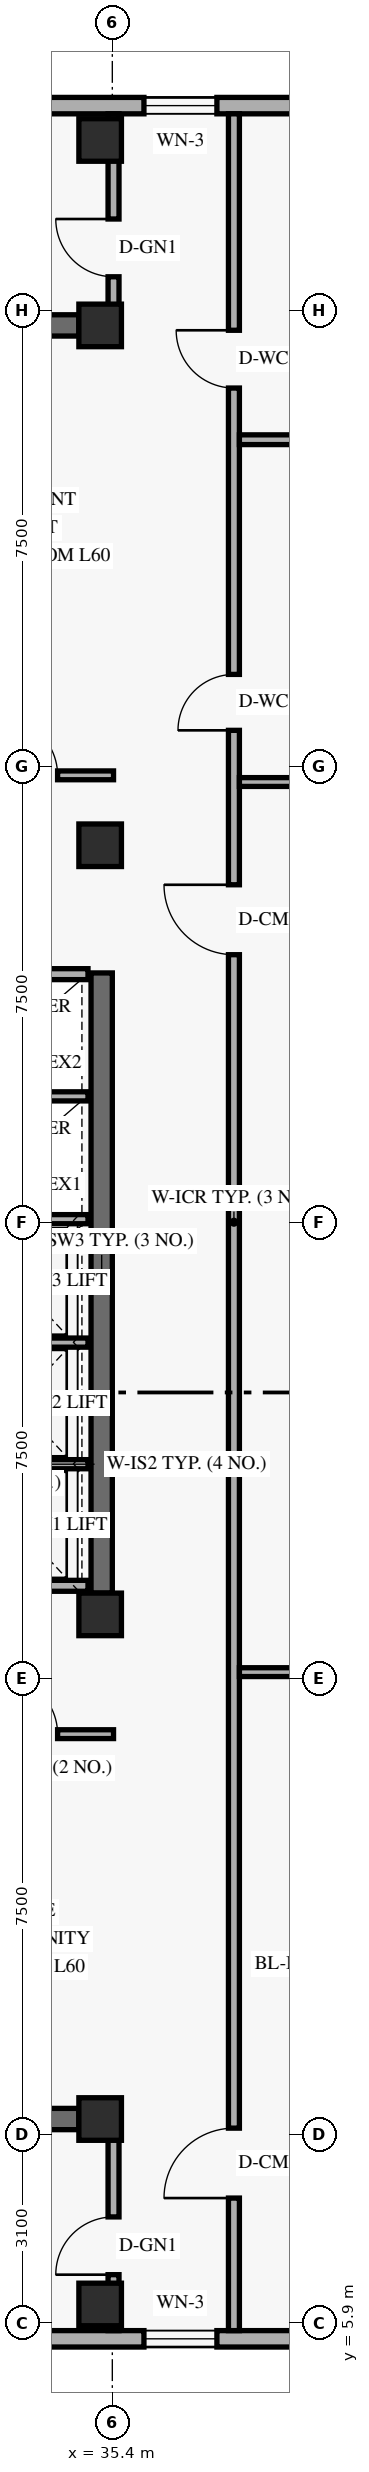
"""IFC4 building model, lengths in metres.
Left out: names, types, materials, properties, quantities, classifications, styles, units other than length and angle.
Written with IfcOpenShell. Run it as: python <this file> out.ifc"""

import sys

from ifc_helpers import new_model, si_unit, direction, frame, frame_2d, origin, origin_2d, place, context, subcontext, project, spatial, rectangle, extrude, element, fill, save


model = new_model("IFC4")
c1 = context("Model", 3, precision=1e-05, world=origin(), true_north=direction((0.0, 1.0)))
c2 = subcontext(c1, "Body", "Model", "MODEL_VIEW")
j1 = project(units=[si_unit("LENGTHUNIT", "METRE"), si_unit("PLANEANGLEUNIT", "RADIAN")], contexts=[c1])
p1 = place(None, origin())
s1 = spatial("IfcSite", under=j1, at=p1, CompositionType="ELEMENT")
p2 = place(p1, origin())
s2 = spatial("IfcBuilding", under=s1, at=p2, CompositionType="ELEMENT")
p3 = place(p2, frame((0.0, 0.0, 231.0)))
s3 = spatial("IfcBuildingStorey", under=s2, at=p3, CompositionType="ELEMENT", Elevation=231.0)
p4 = place(p3, frame((35.225, 17.9, 0.0), z_axis=(0.0, 0.0, 1.0), x_axis=(0.0, 1.0, 0.0)))
e1 = element("IfcWall", 1, at=p4, inside=s3, PredefinedType="SHEAR", context=c2, shape_type="SweptSolid", body=[
    extrude(rectangle(XDim=10.2, YDim=0.35, at=frame_2d((5.1, 0.0))), origin(), (0.0, 0.0, 1.0), 3.421),
])
for number, where, z_axis, x_axis in (
    (2, (24.55, 9.25, 0.0), (0.0, 0.0, 1.0), (1.0, 0.0, 0.0)),
    (3, (24.55, 38.75, 0.0), (0.0, 0.0, 1.0), (1.0, 0.0, 0.0)),
):
    element("IfcWall", number, at=place(p3, frame(where, z_axis=z_axis, x_axis=x_axis)), inside=s3, PredefinedType="SHEAR", context=c2, shape_type="SweptSolid", body=[
        extrude(rectangle(XDim=10.3, YDim=0.35, at=frame_2d((5.15, 0.0))), origin(), (0.0, 0.0, 1.0), 3.96),
    ])
for number, where, z_axis, x_axis in (
    (4, (35.2, 6.2, 0.0), (0.0, 0.0, 1.0), (1.0, 0.0, 0.0)),
    (5, (35.2, 9.25, 0.0), (0.0, 0.0, 1.0), (1.0, 0.0, 0.0)),
    (6, (35.2, 17.55, 0.0), (0.0, 0.0, 1.0), (1.0, 0.0, 0.0)),
    (7, (35.2, 30.2, 0.0), (0.0, 0.0, 1.0), (1.0, 0.0, 0.0)),
    (8, (35.2, 38.75, 0.0), (0.0, 0.0, 1.0), (1.0, 0.0, 0.0)),
    (9, (35.2, 41.8, 0.0), (0.0, 0.0, 1.0), (1.0, 0.0, 0.0)),
):
    element("IfcColumn", number, at=place(p3, frame(where, z_axis=z_axis, x_axis=x_axis)), inside=s3, PredefinedType="COLUMN", context=c2, shape_type="SweptSolid", body=[
        extrude(rectangle(XDim=0.7, YDim=0.7, at=origin_2d()), origin(), (0.0, 0.0, 1.0), 4.2),
    ])
p5 = place(p3, frame((25.82, 5.635, 0.0), z_axis=(0.0, 0.0, 1.0), x_axis=(1.0, 0.0, 0.0)))
e10 = element("IfcWall", 10, at=p5, inside=s3, PredefinedType="SOLIDWALL", context=c2, shape_type="SweptSolid", body=[
    extrude(rectangle(XDim=32.96, YDim=0.27, at=frame_2d((16.48, 0.0))), origin(), (0.0, 0.0, 1.0), 3.96),
])
p6 = place(p5, frame((3.27, 0.0, 0.85)))
e11 = element("IfcOpeningElement", 11, at=p6, cuts=e10, PredefinedType="OPENING", context=c2, shape_type="SweptSolid", body=[
    extrude(rectangle(XDim=2.4, YDim=1.9, at=frame_2d((1.2, 0.95))), frame((0.0, 0.145, 0.0), z_axis=(0.0, -1.0, 0.0), x_axis=(1.0, 0.0, 0.0)), (0.0, 0.0, 1.0), 0.29),
])
p7 = place(p5, frame((10.1, 0.0, 0.85)))
e12 = element("IfcOpeningElement", 12, at=p7, cuts=e10, PredefinedType="OPENING", context=c2, shape_type="SweptSolid", body=[
    extrude(rectangle(XDim=1.2, YDim=1.5, at=frame_2d((0.6, 0.75))), frame((0.0, 0.145, 0.0), z_axis=(0.0, -1.0, 0.0), x_axis=(1.0, 0.0, 0.0)), (0.0, 0.0, 1.0), 0.29),
])
p8 = place(p5, frame((15.507, 0.0, 0.85)))
e13 = element("IfcOpeningElement", 13, at=p8, cuts=e10, PredefinedType="OPENING", context=c2, shape_type="SweptSolid", body=[
    extrude(rectangle(XDim=2.4, YDim=1.9, at=frame_2d((1.2, 0.95))), frame((0.0, 0.145, 0.0), z_axis=(0.0, -1.0, 0.0), x_axis=(1.0, 0.0, 0.0)), (0.0, 0.0, 1.0), 0.29),
])
p9 = place(p3, frame((58.78, 42.365, 0.0), z_axis=(0.0, 0.0, 1.0), x_axis=(-1.0, 0.0, 0.0)))
e14 = element("IfcWall", 14, at=p9, inside=s3, PredefinedType="SOLIDWALL", context=c2, shape_type="SweptSolid", body=[
    extrude(rectangle(XDim=32.96, YDim=0.27, at=frame_2d((16.48, 0.0))), origin(), (0.0, 0.0, 1.0), 3.96),
])
p10 = place(p9, frame((27.29, 0.0, 0.85)))
e15 = element("IfcOpeningElement", 15, at=p10, cuts=e14, PredefinedType="OPENING", context=c2, shape_type="SweptSolid", body=[
    extrude(rectangle(XDim=2.4, YDim=1.9, at=frame_2d((1.2, 0.95))), frame((0.0, 0.145, 0.0), z_axis=(0.0, -1.0, 0.0), x_axis=(1.0, 0.0, 0.0)), (0.0, 0.0, 1.0), 0.29),
])
p11 = place(p9, frame((21.66, 0.0, 0.85)))
e16 = element("IfcOpeningElement", 16, at=p11, cuts=e14, PredefinedType="OPENING", context=c2, shape_type="SweptSolid", body=[
    extrude(rectangle(XDim=1.2, YDim=1.5, at=frame_2d((0.6, 0.75))), frame((0.0, 0.145, 0.0), z_axis=(0.0, -1.0, 0.0), x_axis=(1.0, 0.0, 0.0)), (0.0, 0.0, 1.0), 0.29),
])
p12 = place(p9, frame((17.13, 0.0, 0.85)))
e17 = element("IfcOpeningElement", 17, at=p12, cuts=e14, PredefinedType="OPENING", context=c2, shape_type="SweptSolid", body=[
    extrude(rectangle(XDim=2.4, YDim=1.9, at=frame_2d((1.2, 0.95))), frame((0.0, 0.145, 0.0), z_axis=(0.0, -1.0, 0.0), x_axis=(1.0, 0.0, 0.0)), (0.0, 0.0, 1.0), 0.29),
])
p13 = place(p9, frame((5.445, 0.0, 0.85)))
e18 = element("IfcOpeningElement", 18, at=p13, cuts=e14, PredefinedType="OPENING", context=c2, shape_type="SweptSolid", body=[
    extrude(rectangle(XDim=2.4, YDim=1.9, at=frame_2d((1.2, 0.95))), frame((0.0, 0.145, 0.0), z_axis=(0.0, -1.0, 0.0), x_axis=(1.0, 0.0, 0.0)), (0.0, 0.0, 1.0), 0.29),
])
for number, where, z_axis, x_axis in (
    (19, (32.74, 18.02, 0.0), (0.0, 0.0, 1.0), (1.0, 0.0, 0.0)),
    (20, (32.74, 28.08, 0.0), (0.0, 0.0, 1.0), (1.0, 0.0, 0.0)),
):
    element("IfcWall", number, at=place(p3, frame(where, z_axis=z_axis, x_axis=x_axis)), inside=s3, PredefinedType="STANDARD", context=c2, shape_type="SweptSolid", body=[
        extrude(rectangle(XDim=2.26, YDim=0.18, at=frame_2d((1.13, 0.0))), origin(), (0.0, 0.0, 1.0), 3.96),
    ])
for number, where, z_axis, x_axis in (
    (21, (32.74, 20.02, 0.0), (0.0, 0.0, 1.0), (1.0, 0.0, 0.0)),
    (22, (32.74, 22.02, 0.0), (0.0, 0.0, 1.0), (1.0, 0.0, 0.0)),
    (23, (32.74, 24.05, 0.0), (0.0, 0.0, 1.0), (1.0, 0.0, 0.0)),
    (24, (32.74, 26.07, 0.0), (0.0, 0.0, 1.0), (1.0, 0.0, 0.0)),
):
    element("IfcWall", number, at=place(p3, frame(where, z_axis=z_axis, x_axis=x_axis)), inside=s3, PredefinedType="STANDARD", context=c2, shape_type="SweptSolid", body=[
        extrude(rectangle(XDim=2.26, YDim=0.15, at=frame_2d((1.13, 0.0))), origin(), (0.0, 0.0, 1.0), 3.96),
    ])
p14 = place(p3, frame((37.4, 5.77, 0.0), z_axis=(0.0, 0.0, 1.0), x_axis=(0.0, 1.0, 0.0)))
e25 = element("IfcWall", 25, at=p14, inside=s3, PredefinedType="STANDARD", context=c2, shape_type="SweptSolid", body=[
    extrude(rectangle(XDim=36.46, YDim=0.18, at=frame_2d((18.23, 0.0))), origin(), (0.0, 0.0, 1.0), 3.403),
])
p15 = place(p14, frame((26.32, 0.0, 0.0)))
e26 = element("IfcOpeningElement", 26, at=p15, cuts=e25, PredefinedType="OPENING", context=c2, shape_type="SweptSolid", body=[
    extrude(rectangle(XDim=0.92, YDim=2.14, at=frame_2d((0.46, 1.07))), frame((0.0, 0.1, 0.0), z_axis=(0.0, -1.0, 0.0), x_axis=(1.0, 0.0, 0.0)), (0.0, 0.0, 1.0), 0.2),
])
p16 = place(p14, frame((31.95, 0.0, 0.0)))
e27 = element("IfcOpeningElement", 27, at=p16, cuts=e25, PredefinedType="OPENING", context=c2, shape_type="SweptSolid", body=[
    extrude(rectangle(XDim=0.95, YDim=2.14, at=frame_2d((0.475, 1.07))), frame((0.0, 0.1, 0.0), z_axis=(0.0, -1.0, 0.0), x_axis=(1.0, 0.0, 0.0)), (0.0, 0.0, 1.0), 0.2),
])
p17 = place(p14, frame((2.18, 0.0, 0.0)))
e28 = element("IfcOpeningElement", 28, at=p17, cuts=e25, PredefinedType="OPENING", context=c2, shape_type="SweptSolid", body=[
    extrude(rectangle(XDim=1.15, YDim=2.15, at=frame_2d((0.575, 1.075))), frame((0.0, 0.1, 0.0), z_axis=(0.0, -1.0, 0.0), x_axis=(1.0, 0.0, 0.0)), (0.0, 0.0, 1.0), 0.2),
])
p18 = place(p14, frame((22.63, 0.0, 0.0)))
e29 = element("IfcOpeningElement", 29, at=p18, cuts=e25, PredefinedType="OPENING", context=c2, shape_type="SweptSolid", body=[
    extrude(rectangle(XDim=1.15, YDim=2.15, at=frame_2d((0.575, 1.075))), frame((0.0, 0.1, 0.0), z_axis=(0.0, -1.0, 0.0), x_axis=(1.0, 0.0, 0.0)), (0.0, 0.0, 1.0), 0.2),
])
p19 = place(p3, frame((35.42, 5.77, 0.0), z_axis=(0.0, 0.0, 1.0), x_axis=(0.0, 1.0, 0.0)))
e30 = element("IfcWall", 30, at=p19, inside=s3, PredefinedType="STANDARD", context=c2, shape_type="SweptSolid", body=[
    extrude(rectangle(XDim=3.48, YDim=0.18, at=frame_2d((1.74, 0.0))), origin(), (0.0, 0.0, 1.0), 3.403),
])
p20 = place(p19, frame((0.92, 0.0, 0.0)))
e31 = element("IfcOpeningElement", 31, at=p20, cuts=e30, PredefinedType="OPENING", context=c2, shape_type="SweptSolid", body=[
    extrude(rectangle(XDim=0.95, YDim=2.15, at=frame_2d((0.475, 1.075))), frame((0.0, 0.1, 0.0), z_axis=(0.0, -1.0, 0.0), x_axis=(1.0, 0.0, 0.0)), (0.0, 0.0, 1.0), 0.2),
])
p21 = place(p3, frame((35.42, 38.75, 0.0), z_axis=(0.0, 0.0, 1.0), x_axis=(0.0, 1.0, 0.0)))
e32 = element("IfcWall", 32, at=p21, inside=s3, PredefinedType="STANDARD", context=c2, shape_type="SweptSolid", body=[
    extrude(rectangle(XDim=3.48, YDim=0.18, at=frame_2d((1.74, 0.0))), origin(), (0.0, 0.0, 1.0), 3.403),
])
p22 = place(p21, frame((0.8, 0.0, 0.0)))
e33 = element("IfcOpeningElement", 33, at=p22, cuts=e32, PredefinedType="OPENING", context=c2, shape_type="SweptSolid", body=[
    extrude(rectangle(XDim=0.95, YDim=2.15, at=frame_2d((0.475, 1.075))), frame((0.0, 0.1, 0.0), z_axis=(0.0, -1.0, 0.0), x_axis=(1.0, 0.0, 0.0)), (0.0, 0.0, 1.0), 0.2),
])
for number, where, z_axis, x_axis in (
    (34, (37.49, 16.6, 0.0), (0.0, 0.0, 1.0), (1.0, 0.0, 0.0)),
    (35, (37.49, 31.24, 0.0), (0.0, 0.0, 1.0), (1.0, 0.0, 0.0)),
):
    element("IfcWall", number, at=place(p3, frame(where, z_axis=z_axis, x_axis=x_axis)), inside=s3, PredefinedType="PARTITIONING", context=c2, shape_type="SweptSolid", body=[
        extrude(rectangle(XDim=24.64, YDim=0.145, at=frame_2d((12.32, 0.0))), origin(), (0.0, 0.0, 1.0), 3.403),
    ])
p23 = place(p3, frame((37.49, 36.87, 0.0), z_axis=(0.0, 0.0, 1.0), x_axis=(1.0, 0.0, 0.0)))
e36 = element("IfcWall", 36, at=p23, inside=s3, PredefinedType="PLUMBINGWALL", context=c2, shape_type="SweptSolid", body=[
    extrude(rectangle(XDim=5.93, YDim=0.16, at=frame_2d((2.965, 0.0))), origin(), (0.0, 0.0, 1.0), 3.96),
])
p24 = place(p3, frame((32.722, 15.58, 0.0), z_axis=(0.0, 0.0, 1.0), x_axis=(1.0, 0.0, 0.0)))
e37 = element("IfcWall", 37, at=p24, inside=s3, PredefinedType="PARTITIONING", context=c2, shape_type="SweptSolid", body=[
    extrude(rectangle(XDim=2.698, YDim=0.145, at=frame_2d((1.349, 0.0))), origin(), (0.0, 0.0, 1.0), 3.403),
])
p25 = place(p24, frame((0.827, 0.0, 0.0)))
e38 = element("IfcOpeningElement", 38, at=p25, cuts=e37, PredefinedType="OPENING", context=c2, shape_type="SweptSolid", body=[
    extrude(rectangle(XDim=0.95, YDim=2.15, at=frame_2d((0.475, 1.075))), frame((0.0, 0.083, 0.0), z_axis=(0.0, -1.0, 0.0), x_axis=(1.0, 0.0, 0.0)), (0.0, 0.0, 1.0), 0.165),
])
p26 = place(p3, frame((32.722, 31.35, 0.0), z_axis=(0.0, 0.0, 1.0), x_axis=(1.0, 0.0, 0.0)))
e39 = element("IfcWall", 39, at=p26, inside=s3, PredefinedType="PARTITIONING", context=c2, shape_type="SweptSolid", body=[
    extrude(rectangle(XDim=2.698, YDim=0.145, at=frame_2d((1.349, 0.0))), origin(), (0.0, 0.0, 1.0), 3.403),
])
p27 = place(p26, frame((0.827, 0.0, 0.0)))
e40 = element("IfcOpeningElement", 40, at=p27, cuts=e39, PredefinedType="OPENING", context=c2, shape_type="SweptSolid", body=[
    extrude(rectangle(XDim=0.95, YDim=2.15, at=frame_2d((0.475, 1.075))), frame((0.0, 0.083, 0.0), z_axis=(0.0, -1.0, 0.0), x_axis=(1.0, 0.0, 0.0)), (0.0, 0.0, 1.0), 0.165),
])
p28 = place(p7, origin())
e41 = element("IfcWindow", 41, at=p28, inside=s3, PartitioningType="SINGLE_PANEL", PredefinedType="WINDOW", context=c2, shape_type="SweptSolid", body=[
    extrude(rectangle(XDim=1.2, YDim=1.5, at=frame_2d((0.6, 0.75))), frame((0.0, 0.03, 0.0), z_axis=(0.0, -1.0, 0.0), x_axis=(1.0, 0.0, 0.0)), (0.0, 0.0, 1.0), 0.06),
])
fill(e12, e41)
p29 = place(p11, origin())
e42 = element("IfcWindow", 42, at=p29, inside=s3, PartitioningType="SINGLE_PANEL", PredefinedType="WINDOW", context=c2, shape_type="SweptSolid", body=[
    extrude(rectangle(XDim=1.2, YDim=1.5, at=frame_2d((0.6, 0.75))), frame((0.0, 0.03, 0.0), z_axis=(0.0, -1.0, 0.0), x_axis=(1.0, 0.0, 0.0)), (0.0, 0.0, 1.0), 0.06),
])
fill(e16, e42)
p30 = place(p15, origin())
e43 = element("IfcDoor", 43, at=p30, inside=s3, OperationType="SINGLE_SWING_LEFT", PredefinedType="DOOR", context=c2, shape_type="SweptSolid", body=[
    extrude(rectangle(XDim=0.92, YDim=2.14, at=frame_2d((0.46, 1.07))), frame((0.0, 0.025, 0.0), z_axis=(0.0, -1.0, 0.0), x_axis=(1.0, 0.0, 0.0)), (0.0, 0.0, 1.0), 0.05),
])
fill(e26, e43)
p31 = place(p16, origin())
e44 = element("IfcDoor", 44, at=p31, inside=s3, OperationType="SINGLE_SWING_RIGHT", PredefinedType="DOOR", context=c2, shape_type="SweptSolid", body=[
    extrude(rectangle(XDim=0.95, YDim=2.14, at=frame_2d((0.475, 1.07))), frame((0.0, 0.025, 0.0), z_axis=(0.0, -1.0, 0.0), x_axis=(1.0, 0.0, 0.0)), (0.0, 0.0, 1.0), 0.05),
])
fill(e27, e44)
p32 = place(p25, origin())
e45 = element("IfcDoor", 45, at=p32, inside=s3, OperationType="SINGLE_SWING_LEFT", PredefinedType="DOOR", context=c2, shape_type="SweptSolid", body=[
    extrude(rectangle(XDim=0.95, YDim=2.15, at=frame_2d((0.475, 1.075))), frame((0.0, 0.025, 0.0), z_axis=(0.0, -1.0, 0.0), x_axis=(1.0, 0.0, 0.0)), (0.0, 0.0, 1.0), 0.05),
])
fill(e38, e45)
p33 = place(p27, origin())
e46 = element("IfcDoor", 46, at=p33, inside=s3, OperationType="SINGLE_SWING_LEFT", PredefinedType="DOOR", context=c2, shape_type="SweptSolid", body=[
    extrude(rectangle(XDim=0.95, YDim=2.15, at=frame_2d((0.475, 1.075))), frame((0.0, 0.025, 0.0), z_axis=(0.0, -1.0, 0.0), x_axis=(1.0, 0.0, 0.0)), (0.0, 0.0, 1.0), 0.05),
])
fill(e40, e46)
p34 = place(p17, origin())
e47 = element("IfcDoor", 47, at=p34, inside=s3, OperationType="SINGLE_SWING_LEFT", PredefinedType="DOOR", context=c2, shape_type="SweptSolid", body=[
    extrude(rectangle(XDim=1.15, YDim=2.15, at=frame_2d((0.575, 1.075))), frame((0.0, 0.025, 0.0), z_axis=(0.0, -1.0, 0.0), x_axis=(1.0, 0.0, 0.0)), (0.0, 0.0, 1.0), 0.05),
])
fill(e28, e47)
p35 = place(p18, origin())
e48 = element("IfcDoor", 48, at=p35, inside=s3, OperationType="SINGLE_SWING_RIGHT", PredefinedType="DOOR", context=c2, shape_type="SweptSolid", body=[
    extrude(rectangle(XDim=1.15, YDim=2.15, at=frame_2d((0.575, 1.075))), frame((0.0, 0.025, 0.0), z_axis=(0.0, -1.0, 0.0), x_axis=(1.0, 0.0, 0.0)), (0.0, 0.0, 1.0), 0.05),
])
fill(e29, e48)
p36 = place(p20, origin())
e49 = element("IfcDoor", 49, at=p36, inside=s3, OperationType="SINGLE_SWING_LEFT", PredefinedType="DOOR", context=c2, shape_type="SweptSolid", body=[
    extrude(rectangle(XDim=0.95, YDim=2.15, at=frame_2d((0.475, 1.075))), frame((0.0, 0.025, 0.0), z_axis=(0.0, -1.0, 0.0), x_axis=(1.0, 0.0, 0.0)), (0.0, 0.0, 1.0), 0.05),
])
fill(e31, e49)
p37 = place(p22, origin())
e50 = element("IfcDoor", 50, at=p37, inside=s3, OperationType="SINGLE_SWING_RIGHT", PredefinedType="DOOR", context=c2, shape_type="SweptSolid", body=[
    extrude(rectangle(XDim=0.95, YDim=2.15, at=frame_2d((0.475, 1.075))), frame((0.0, 0.025, 0.0), z_axis=(0.0, -1.0, 0.0), x_axis=(1.0, 0.0, 0.0)), (0.0, 0.0, 1.0), 0.05),
])
fill(e33, e50)
save(model, sys.argv[1])
